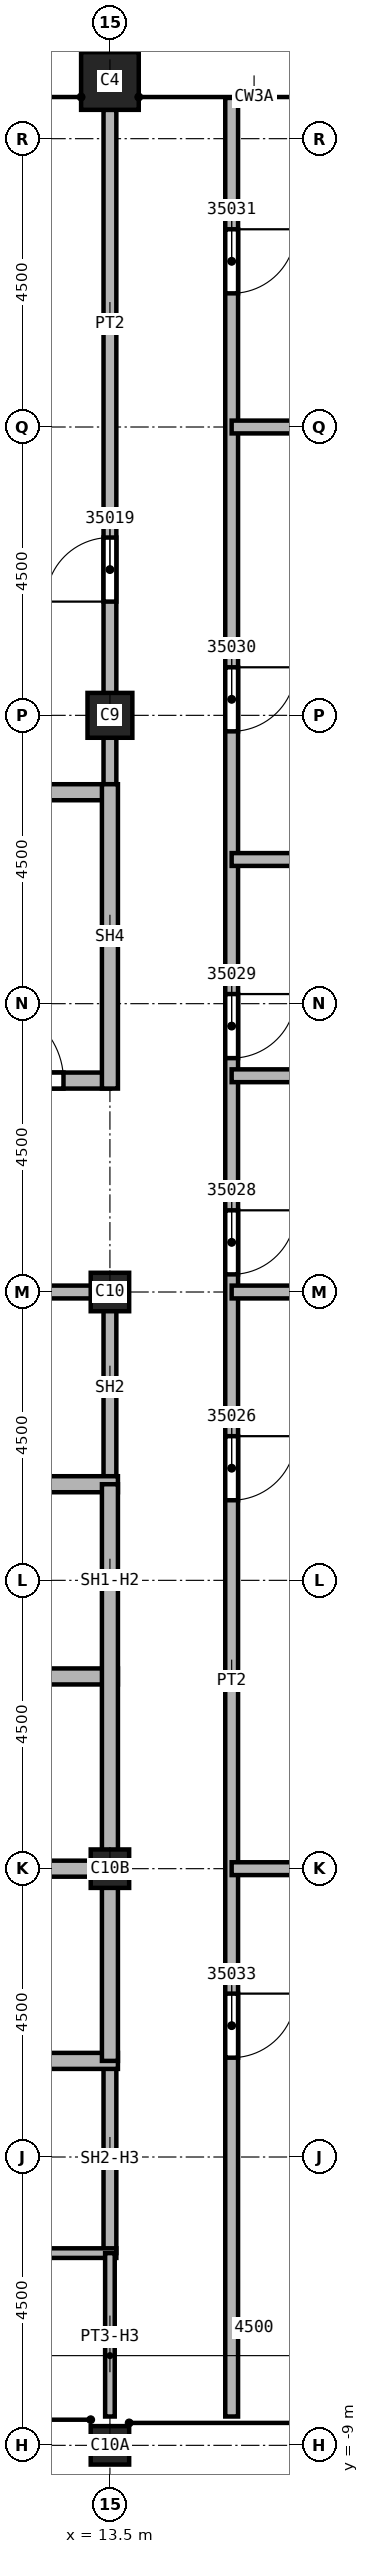
"""IFC4 building model, lengths in metres.
Left out: names, types, materials, properties, quantities, classifications, styles, units other than length and angle.
Written with IfcOpenShell. Run it as: python <this file> out.ifc"""

import sys

from ifc_helpers import new_model, si_unit, direction, frame, frame_2d, origin, origin_2d, place, context, subcontext, project, spatial, rectangle, extrude, element, fill, save


model = new_model("IFC4")
c1 = context("Model", 3, precision=1e-05, world=origin(), true_north=direction((0.0, 1.0)))
c2 = subcontext(c1, "Body", "Model", "MODEL_VIEW")
j1 = project(units=[si_unit("LENGTHUNIT", "METRE"), si_unit("PLANEANGLEUNIT", "RADIAN")], contexts=[c1])
p1 = place(None, origin())
s1 = spatial("IfcSite", under=j1, at=p1, CompositionType="ELEMENT")
p2 = place(p1, origin())
s2 = spatial("IfcBuilding", under=s1, at=p2, CompositionType="ELEMENT")
p3 = place(p2, frame((0.0, 0.0, 376.0)))
s3 = spatial("IfcBuildingStorey", under=s2, at=p3, CompositionType="ELEMENT", Elevation=376.0)
p4 = place(p3, frame((13.5, 18.0, 0.0), z_axis=(0.0, 0.0, 1.0), x_axis=(1.0, 0.0, 0.0)))
e1 = element("IfcColumn", 1, at=p4, inside=s3, PredefinedType="COLUMN", context=c2, shape_type="SweptSolid", body=[
    extrude(rectangle(XDim=0.7, YDim=0.7, at=origin_2d()), origin(), (0.0, 0.0, 1.0), 4.6),
])
p5 = place(p3, frame((13.5, 0.0, 0.0), z_axis=(0.0, 0.0, 1.0), x_axis=(1.0, 0.0, 0.0)))
e2 = element("IfcColumn", 2, at=p5, inside=s3, PredefinedType="COLUMN", context=c2, shape_type="SweptSolid", body=[
    extrude(rectangle(XDim=0.6, YDim=0.6, at=origin_2d()), origin(), (0.0, 0.0, 1.0), 7.919),
])
p6 = place(p3, frame((13.5, 9.0, 0.0), z_axis=(0.0, 0.0, 1.0), x_axis=(1.0, 0.0, 0.0)))
e3 = element("IfcColumn", 3, at=p6, inside=s3, PredefinedType="COLUMN", context=c2, shape_type="SweptSolid", body=[
    extrude(rectangle(XDim=0.6, YDim=0.6, at=origin_2d()), origin(), (0.0, 0.0, 1.0), 4.6),
])
p7 = place(p3, frame((13.5, -9.0, 0.0), z_axis=(0.0, 0.0, 1.0), x_axis=(1.0, 0.0, 0.0)))
e4 = element("IfcColumn", 4, at=p7, inside=s3, PredefinedType="COLUMN", context=c2, shape_type="SweptSolid", body=[
    extrude(rectangle(XDim=0.6, YDim=0.6, at=origin_2d()), origin(), (0.0, 0.0, 1.0), 3.725),
])
p8 = place(p3, frame((13.5, 27.9, 0.0), z_axis=(0.0, 0.0, 1.0), x_axis=(1.0, 0.0, 0.0)))
e5 = element("IfcColumn", 5, at=p8, inside=s3, PredefinedType="COLUMN", context=c2, shape_type="SweptSolid", body=[
    extrude(rectangle(XDim=0.9, YDim=0.9, at=origin_2d()), origin(), (0.0, 0.0, 1.0), 4.6),
])
p9 = place(p3, frame((13.5, 16.675, 0.0), z_axis=(0.0, 0.0, 1.0), x_axis=(0.0, 1.0, 0.0)))
e6 = element("IfcWall", 6, at=p9, inside=s3, PredefinedType="PARTITIONING", context=c2, shape_type="SweptSolid", body=[
    extrude(rectangle(XDim=10.775, YDim=0.2, at=frame_2d((5.387, 0.0))), origin(), (0.0, 0.0, 1.0), 4.15),
])
p10 = place(p9, frame((3.1, 0.0, 0.0)))
e7 = element("IfcOpeningElement", 7, at=p10, cuts=e6, PredefinedType="OPENING", context=c2, shape_type="SweptSolid", body=[
    extrude(rectangle(XDim=1.0, YDim=2.1, at=frame_2d((0.5, 1.05))), frame((0.0, 0.1, 0.0), z_axis=(0.0, -1.0, 0.0), x_axis=(1.0, 0.0, 0.0)), (0.0, 0.0, 1.0), 0.2),
])
p11 = place(p3, frame((15.4, 27.636, 0.0), z_axis=(0.0, 0.0, 1.0), x_axis=(0.0, -1.0, 0.0)))
e8 = element("IfcWall", 8, at=p11, inside=s3, PredefinedType="PARTITIONING", context=c2, shape_type="SweptSolid", body=[
    extrude(rectangle(XDim=36.186, YDim=0.2, at=frame_2d((18.093, 0.0))), origin(), (0.0, 0.0, 1.0), 4.15),
])
p12 = place(p11, frame((20.886, 0.0, 0.0)))
e9 = element("IfcOpeningElement", 9, at=p12, cuts=e8, PredefinedType="OPENING", context=c2, shape_type="SweptSolid", body=[
    extrude(rectangle(XDim=1.0, YDim=2.1, at=frame_2d((0.5, 1.05))), frame((0.0, 0.1, 0.0), z_axis=(0.0, -1.0, 0.0), x_axis=(1.0, 0.0, 0.0)), (0.0, 0.0, 1.0), 0.2),
])
p13 = place(p11, frame((17.361, 0.0, 0.0)))
e10 = element("IfcOpeningElement", 10, at=p13, cuts=e8, PredefinedType="OPENING", context=c2, shape_type="SweptSolid", body=[
    extrude(rectangle(XDim=1.0, YDim=2.1, at=frame_2d((0.5, 1.05))), frame((0.0, 0.1, 0.0), z_axis=(0.0, -1.0, 0.0), x_axis=(1.0, 0.0, 0.0)), (0.0, 0.0, 1.0), 0.2),
])
p14 = place(p11, frame((13.986, 0.0, 0.0)))
e11 = element("IfcOpeningElement", 11, at=p14, cuts=e8, PredefinedType="OPENING", context=c2, shape_type="SweptSolid", body=[
    extrude(rectangle(XDim=1.0, YDim=2.1, at=frame_2d((0.5, 1.05))), frame((0.0, 0.1, 0.0), z_axis=(0.0, -1.0, 0.0), x_axis=(1.0, 0.0, 0.0)), (0.0, 0.0, 1.0), 0.2),
])
p15 = place(p11, frame((8.886, 0.0, 0.0)))
e12 = element("IfcOpeningElement", 12, at=p15, cuts=e8, PredefinedType="OPENING", context=c2, shape_type="SweptSolid", body=[
    extrude(rectangle(XDim=1.0, YDim=2.1, at=frame_2d((0.5, 1.05))), frame((0.0, 0.1, 0.0), z_axis=(0.0, -1.0, 0.0), x_axis=(1.0, 0.0, 0.0)), (0.0, 0.0, 1.0), 0.2),
])
p16 = place(p11, frame((2.05, 0.0, 0.0)))
e13 = element("IfcOpeningElement", 13, at=p16, cuts=e8, PredefinedType="OPENING", context=c2, shape_type="SweptSolid", body=[
    extrude(rectangle(XDim=1.0, YDim=2.1, at=frame_2d((0.5, 1.05))), frame((0.0, 0.1, 0.0), z_axis=(0.0, -1.0, 0.0), x_axis=(1.0, 0.0, 0.0)), (0.0, 0.0, 1.0), 0.2),
])
p17 = place(p11, frame((29.586, 0.0, 0.0)))
e14 = element("IfcOpeningElement", 14, at=p17, cuts=e8, PredefinedType="OPENING", context=c2, shape_type="SweptSolid", body=[
    extrude(rectangle(XDim=1.0, YDim=2.1, at=frame_2d((0.5, 1.05))), frame((0.0, 0.1, 0.0), z_axis=(0.0, -1.0, 0.0), x_axis=(1.0, 0.0, 0.0)), (0.0, 0.0, 1.0), 0.2),
])
p18 = place(p3, frame((15.4, 9.0, 0.0), z_axis=(0.0, 0.0, 1.0), x_axis=(1.0, 0.0, 0.0)))
e15 = element("IfcWall", 15, at=p18, inside=s3, PredefinedType="PARTITIONING", context=c2, shape_type="SweptSolid", body=[
    extrude(rectangle(XDim=11.15, YDim=0.2, at=frame_2d((5.575, 0.0))), origin(), (0.0, 0.0, 1.0), 3.754),
])
for number, where, z_axis, x_axis in (
    (16, (15.4, 12.375, 0.0), (0.0, 0.0, 1.0), (1.0, 0.0, 0.0)),
    (17, (15.4, 15.75, 0.0), (0.0, 0.0, 1.0), (1.0, 0.0, 0.0)),
):
    element("IfcWall", number, at=place(p3, frame(where, z_axis=z_axis, x_axis=x_axis)), inside=s3, PredefinedType="PARTITIONING", context=c2, shape_type="SweptSolid", body=[
        extrude(rectangle(XDim=11.336, YDim=0.2, at=frame_2d((5.668, 0.0))), origin(), (0.0, 0.0, 1.0), 4.15),
    ])
p19 = place(p3, frame((15.4, 22.5, 0.0), z_axis=(0.0, 0.0, 1.0), x_axis=(1.0, 0.0, 0.0)))
e18 = element("IfcWall", 18, at=p19, inside=s3, PredefinedType="PARTITIONING", context=c2, shape_type="SweptSolid", body=[
    extrude(rectangle(XDim=4.6, YDim=0.2, at=frame_2d((2.3, 0.0))), origin(), (0.0, 0.0, 1.0), 4.15),
])
p20 = place(p3, frame((26.55, 0.0, 0.0), z_axis=(0.0, 0.0, 1.0), x_axis=(-1.0, 0.0, 0.0)))
e19 = element("IfcWall", 19, at=p20, inside=s3, PredefinedType="PARTITIONING", context=c2, shape_type="SweptSolid", body=[
    extrude(rectangle(XDim=11.15, YDim=0.2, at=frame_2d((5.575, 0.0))), origin(), (0.0, 0.0, 1.0), 4.15),
])
p21 = place(p3, frame((10.5, 9.0, 0.0), z_axis=(0.0, 0.0, 1.0), x_axis=(1.0, 0.0, 0.0)))
e20 = element("IfcWall", 20, at=p21, inside=s3, PredefinedType="SOLIDWALL", context=c2, shape_type="SweptSolid", body=[
    extrude(rectangle(XDim=3.0, YDim=0.2, at=frame_2d((1.5, 0.0))), origin(), (0.0, 0.0, 1.0), 3.754),
])
p22 = place(p3, frame((13.5, -3.0, 0.0), z_axis=(0.0, 0.0, 1.0), x_axis=(0.0, -1.0, 0.0)))
e21 = element("IfcWall", 21, at=p22, inside=s3, PredefinedType="SOLIDWALL", context=c2, shape_type="SweptSolid", body=[
    extrude(rectangle(XDim=3.0, YDim=0.2, at=frame_2d((1.5, 0.0))), origin(), (0.0, 0.0, 1.0), 3.722),
])
p23 = place(p3, frame((13.5, 9.1, 0.0), z_axis=(0.0, 0.0, 1.0), x_axis=(0.0, -1.0, 0.0)))
e22 = element("IfcWall", 22, at=p23, inside=s3, PredefinedType="SOLIDWALL", context=c2, shape_type="SweptSolid", body=[
    extrude(rectangle(XDim=3.1, YDim=0.2, at=frame_2d((1.55, 0.0))), origin(), (0.0, 0.0, 1.0), 4.15),
])
p24 = place(p3, frame((7.5, -3.0, 0.0), z_axis=(0.0, 0.0, 1.0), x_axis=(1.0, 0.0, 0.0)))
e23 = element("IfcWall", 23, at=p24, inside=s3, PredefinedType="SOLIDWALL", context=c2, shape_type="SweptSolid", body=[
    extrude(rectangle(XDim=6.125, YDim=0.25, at=frame_2d((3.062, 0.0))), origin(), (0.0, 0.0, 1.0), 4.566),
])
p25 = place(p24, frame((0.25, 0.0, 0.0)))
e24 = element("IfcOpeningElement", 24, at=p25, cuts=e23, PredefinedType="OPENING", context=c2, shape_type="SweptSolid", body=[
    extrude(rectangle(XDim=1.1, YDim=2.1, at=frame_2d((0.55, 1.05))), frame((0.0, 0.125, 0.0), z_axis=(0.0, -1.0, 0.0), x_axis=(1.0, 0.0, 0.0)), (0.0, 0.0, 1.0), 0.25),
])
p26 = place(p3, frame((7.5, 3.0, 0.0), z_axis=(0.0, 0.0, 1.0), x_axis=(1.0, 0.0, 0.0)))
e25 = element("IfcWall", 25, at=p26, inside=s3, PredefinedType="SOLIDWALL", context=c2, shape_type="SweptSolid", body=[
    extrude(rectangle(XDim=6.125, YDim=0.25, at=frame_2d((3.062, 0.0))), origin(), (0.0, 0.0, 1.0), 4.15),
])
p27 = place(p26, frame((0.25, 0.0, 0.0)))
e26 = element("IfcOpeningElement", 26, at=p27, cuts=e25, PredefinedType="OPENING", context=c2, shape_type="SweptSolid", body=[
    extrude(rectangle(XDim=1.1, YDim=2.1, at=frame_2d((0.55, 1.05))), frame((0.0, 0.125, 0.0), z_axis=(0.0, -1.0, 0.0), x_axis=(1.0, 0.0, 0.0)), (0.0, 0.0, 1.0), 0.25),
])
p28 = place(p3, frame((10.5, 0.0, 0.0), z_axis=(0.0, 0.0, 1.0), x_axis=(1.0, 0.0, 0.0)))
e27 = element("IfcWall", 27, at=p28, inside=s3, PredefinedType="SOLIDWALL", context=c2, shape_type="SweptSolid", body=[
    extrude(rectangle(XDim=3.125, YDim=0.25, at=frame_2d((1.562, 0.0))), origin(), (0.0, 0.0, 1.0), 7.152),
])
p29 = place(p3, frame((10.5, 6.0, 0.0), z_axis=(0.0, 0.0, 1.0), x_axis=(1.0, 0.0, 0.0)))
e28 = element("IfcWall", 28, at=p29, inside=s3, PredefinedType="SOLIDWALL", context=c2, shape_type="SweptSolid", body=[
    extrude(rectangle(XDim=3.125, YDim=0.25, at=frame_2d((1.562, 0.0))), origin(), (0.0, 0.0, 1.0), 4.15),
])
p30 = place(p3, frame((13.5, 6.0, 0.0), z_axis=(0.0, 0.0, 1.0), x_axis=(0.0, -1.0, 0.0)))
e29 = element("IfcWall", 29, at=p30, inside=s3, PredefinedType="SOLIDWALL", context=c2, shape_type="SweptSolid", body=[
    extrude(rectangle(XDim=9.0, YDim=0.25, at=frame_2d((4.5, 0.0))), origin(), (0.0, 0.0, 1.0), 3.722),
])
p31 = place(p3, frame((4.375, 12.3, 0.0), z_axis=(0.0, 0.0, 1.0), x_axis=(1.0, 0.0, 0.0)))
e30 = element("IfcWall", 30, at=p31, inside=s3, PredefinedType="SOLIDWALL", context=c2, shape_type="SweptSolid", body=[
    extrude(rectangle(XDim=9.125, YDim=0.25, at=frame_2d((4.562, 0.0))), origin(), (0.0, 0.0, 1.0), 4.15),
])
p32 = place(p31, frame((7.2, 0.0, 0.0)))
e31 = element("IfcOpeningElement", 31, at=p32, cuts=e30, PredefinedType="OPENING", context=c2, shape_type="SweptSolid", body=[
    extrude(rectangle(XDim=1.2, YDim=2.1, at=frame_2d((0.6, 1.05))), frame((0.0, 0.125, 0.0), z_axis=(0.0, -1.0, 0.0), x_axis=(1.0, 0.0, 0.0)), (0.0, 0.0, 1.0), 0.25),
])
p33 = place(p3, frame((4.4, 16.8, 0.0), z_axis=(0.0, 0.0, 1.0), x_axis=(1.0, 0.0, 0.0)))
e32 = element("IfcWall", 32, at=p33, inside=s3, PredefinedType="SOLIDWALL", context=c2, shape_type="SweptSolid", body=[
    extrude(rectangle(XDim=9.1, YDim=0.25, at=frame_2d((4.55, 0.0))), origin(), (0.0, 0.0, 1.0), 4.15),
])
p34 = place(p3, frame((13.5, 12.175, 0.0), z_axis=(0.0, 0.0, 1.0), x_axis=(0.0, 1.0, 0.0)))
e33 = element("IfcWall", 33, at=p34, inside=s3, PredefinedType="SOLIDWALL", context=c2, shape_type="SweptSolid", body=[
    extrude(rectangle(XDim=4.75, YDim=0.25, at=frame_2d((2.375, 0.0))), origin(), (0.0, 0.0, 1.0), 4.15),
])
p35 = place(p3, frame((10.5, -6.0, 0.0), z_axis=(0.0, 0.0, 1.0), x_axis=(1.0, 0.0, 0.0)))
e34 = element("IfcWall", 34, at=p35, inside=s3, PredefinedType="PARTITIONING", context=c2, shape_type="SweptSolid", body=[
    extrude(rectangle(XDim=3.1, YDim=0.15, at=frame_2d((1.55, 0.0))), origin(), (0.0, 0.0, 1.0), 4.566),
])
p36 = place(p3, frame((13.5, -6.0, 0.0), z_axis=(0.0, 0.0, 1.0), x_axis=(0.0, -1.0, 0.0)))
e35 = element("IfcWall", 35, at=p36, inside=s3, PredefinedType="PARTITIONING", context=c2, shape_type="SweptSolid", body=[
    extrude(rectangle(XDim=2.55, YDim=0.15, at=frame_2d((1.275, 0.0))), origin(), (0.0, 0.0, 1.0), 3.722),
])
p37 = place(p32, origin())
e36 = element("IfcDoor", 36, at=p37, inside=s3, OperationType="SINGLE_SWING_LEFT", PredefinedType="DOOR", context=c2, shape_type="SweptSolid", body=[
    extrude(rectangle(XDim=1.2, YDim=2.1, at=frame_2d((0.6, 1.05))), frame((0.0, 0.025, 0.0), z_axis=(0.0, -1.0, 0.0), x_axis=(1.0, 0.0, 0.0)), (0.0, 0.0, 1.0), 0.05),
])
fill(e31, e36)
p38 = place(p10, origin())
e37 = element("IfcDoor", 37, at=p38, inside=s3, OperationType="SINGLE_SWING_RIGHT", PredefinedType="DOOR", context=c2, shape_type="SweptSolid", body=[
    extrude(rectangle(XDim=1.0, YDim=2.1, at=frame_2d((0.5, 1.05))), frame((0.0, 0.025, 0.0), z_axis=(0.0, -1.0, 0.0), x_axis=(1.0, 0.0, 0.0)), (0.0, 0.0, 1.0), 0.05),
])
fill(e7, e37)
p39 = place(p12, origin())
e38 = element("IfcDoor", 38, at=p39, inside=s3, OperationType="SINGLE_SWING_LEFT", PredefinedType="DOOR", context=c2, shape_type="SweptSolid", body=[
    extrude(rectangle(XDim=1.0, YDim=2.1, at=frame_2d((0.5, 1.05))), frame((0.0, 0.025, 0.0), z_axis=(0.0, -1.0, 0.0), x_axis=(1.0, 0.0, 0.0)), (0.0, 0.0, 1.0), 0.05),
])
fill(e9, e38)
p40 = place(p13, origin())
e39 = element("IfcDoor", 39, at=p40, inside=s3, OperationType="SINGLE_SWING_LEFT", PredefinedType="DOOR", context=c2, shape_type="SweptSolid", body=[
    extrude(rectangle(XDim=1.0, YDim=2.1, at=frame_2d((0.5, 1.05))), frame((0.0, 0.025, 0.0), z_axis=(0.0, -1.0, 0.0), x_axis=(1.0, 0.0, 0.0)), (0.0, 0.0, 1.0), 0.05),
])
fill(e10, e39)
p41 = place(p14, origin())
e40 = element("IfcDoor", 40, at=p41, inside=s3, OperationType="SINGLE_SWING_RIGHT", PredefinedType="DOOR", context=c2, shape_type="SweptSolid", body=[
    extrude(rectangle(XDim=1.0, YDim=2.1, at=frame_2d((0.5, 1.05))), frame((0.0, 0.025, 0.0), z_axis=(0.0, -1.0, 0.0), x_axis=(1.0, 0.0, 0.0)), (0.0, 0.0, 1.0), 0.05),
])
fill(e11, e40)
p42 = place(p15, origin())
e41 = element("IfcDoor", 41, at=p42, inside=s3, OperationType="SINGLE_SWING_LEFT", PredefinedType="DOOR", context=c2, shape_type="SweptSolid", body=[
    extrude(rectangle(XDim=1.0, YDim=2.1, at=frame_2d((0.5, 1.05))), frame((0.0, 0.025, 0.0), z_axis=(0.0, -1.0, 0.0), x_axis=(1.0, 0.0, 0.0)), (0.0, 0.0, 1.0), 0.05),
])
fill(e12, e41)
p43 = place(p16, origin())
e42 = element("IfcDoor", 42, at=p43, inside=s3, OperationType="SINGLE_SWING_RIGHT", PredefinedType="DOOR", context=c2, shape_type="SweptSolid", body=[
    extrude(rectangle(XDim=1.0, YDim=2.1, at=frame_2d((0.5, 1.05))), frame((0.0, 0.025, 0.0), z_axis=(0.0, -1.0, 0.0), x_axis=(1.0, 0.0, 0.0)), (0.0, 0.0, 1.0), 0.05),
])
fill(e13, e42)
p44 = place(p17, origin())
e43 = element("IfcDoor", 43, at=p44, inside=s3, OperationType="SINGLE_SWING_RIGHT", PredefinedType="DOOR", context=c2, shape_type="SweptSolid", body=[
    extrude(rectangle(XDim=1.0, YDim=2.1, at=frame_2d((0.5, 1.05))), frame((0.0, 0.025, 0.0), z_axis=(0.0, -1.0, 0.0), x_axis=(1.0, 0.0, 0.0)), (0.0, 0.0, 1.0), 0.05),
])
fill(e14, e43)
save(model, sys.argv[1])
